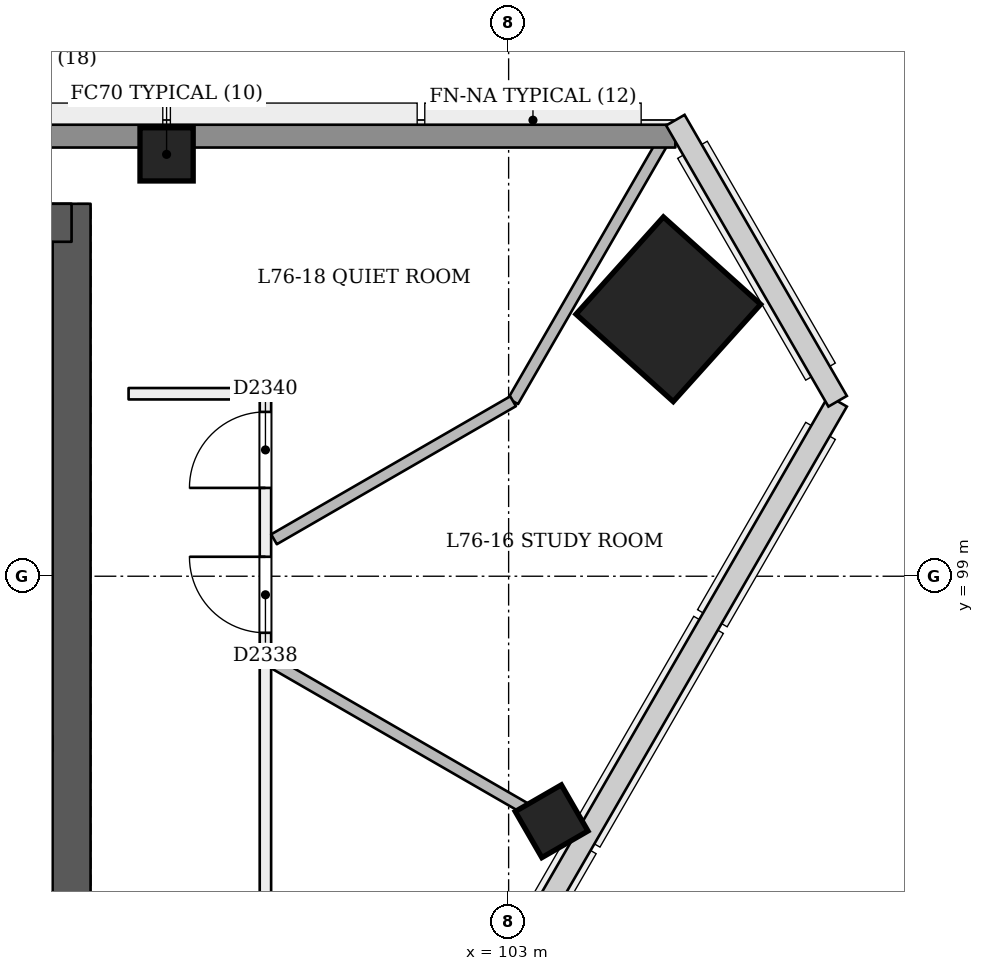
"""IFC4 building model, lengths in metres.
Left out: names, types, materials, properties, quantities, classifications, styles, units other than length and angle.
Written with IfcOpenShell. Run it as: python <this file> out.ifc"""

import sys

from ifc_helpers import new_model, si_unit, direction, frame, frame_2d, origin, origin_2d, place, context, subcontext, project, spatial, rectangle, extrude, element, fill, save


model = new_model("IFC4")
c1 = context("Model", 3, precision=1e-05, world=origin(), true_north=direction((0.0, 1.0)))
c2 = subcontext(c1, "Body", "Model", "MODEL_VIEW")
j1 = project(units=[si_unit("LENGTHUNIT", "METRE"), si_unit("PLANEANGLEUNIT", "RADIAN")], contexts=[c1])
p1 = place(None, origin())
s1 = spatial("IfcSite", under=j1, at=p1, CompositionType="ELEMENT")
p2 = place(p1, origin())
s2 = spatial("IfcBuilding", under=s1, at=p2, CompositionType="ELEMENT")
p3 = place(p2, frame((0.0, 0.0, 295.0)))
s3 = spatial("IfcBuildingStorey", under=s2, at=p3, CompositionType="ELEMENT", Elevation=295.0)
p4 = place(p3, frame((97.25, 93.15, 0.0), z_axis=(0.0, 0.0, 1.0), x_axis=(0.0, 1.0, 0.0)))
e1 = element("IfcWall", 1, at=p4, inside=s3, PredefinedType="SHEAR", context=c2, shape_type="SweptSolid", body=[
    extrude(rectangle(XDim=10.75, YDim=0.5, at=frame_2d((5.375, 0.0))), origin(), (0.0, 0.0, 1.0), 3.6),
])
p5 = place(p3, frame((97.25, 103.65, 0.0), z_axis=(0.0, 0.0, 1.0), x_axis=(-1.0, 0.0, 0.0)))
e2 = element("IfcWall", 2, at=p5, inside=s3, PredefinedType="SHEAR", context=c2, shape_type="SweptSolid", body=[
    extrude(rectangle(XDim=24.75, YDim=0.5, at=frame_2d((12.375, 0.0))), origin(), (0.0, 0.0, 1.0), 3.6),
])
p6 = place(p3, frame((105.135, 102.501, 0.0), z_axis=(-0.028401796786, 0.009286506348, 0.999553449666), x_axis=(0.49888889343, -0.8663809353, 0.02222491757)))
e3 = element("IfcColumn", 3, at=p6, inside=s3, PredefinedType="COLUMN", context=c2, shape_type="SweptSolid", body=[
    extrude(rectangle(XDim=1.72, YDim=1.72, at=origin_2d()), origin(), (0.0, 0.0, 1.0), 3.602),
])
p7 = place(p3, frame((98.5, 104.55, 0.0), z_axis=(0.0, 0.0, 1.0), x_axis=(1.0, 0.0, 0.0)))
e4 = element("IfcColumn", 4, at=p7, inside=s3, PredefinedType="COLUMN", context=c2, shape_type="SweptSolid", body=[
    extrude(rectangle(XDim=0.7, YDim=0.7, at=origin_2d()), origin(), (0.0, 0.0, 1.0), 3.6),
])
p8 = place(p3, frame((103.593, 95.729, -0.021), z_axis=(-0.02222134892, 0.038480872521, 0.999012229206), x_axis=(-0.500174577835, -0.86563950587, 0.022217955907)))
e5 = element("IfcColumn", 5, at=p8, inside=s3, PredefinedType="COLUMN", context=c2, shape_type="SweptSolid", body=[
    extrude(rectangle(XDim=0.7, YDim=0.7, at=origin_2d()), origin(), (0.0, 0.0, 1.0), 3.604),
])
p9 = place(p3, frame((99.8, 90.7, 0.0), z_axis=(0.0, 0.0, 1.0), x_axis=(6.844627e-05, 0.999999997658, 0.0)))
e6 = element("IfcWall", 6, at=p9, inside=s3, PredefinedType="PARTITIONING", context=c2, shape_type="SweptSolid", body=[
    extrude(rectangle(XDim=10.701, YDim=0.15, at=frame_2d((5.35, 0.0))), origin(), (0.0, 0.0, 1.0), 3.2),
])
p10 = place(p9, frame((7.556, 0.0, 0.0)))
e7 = element("IfcOpeningElement", 7, at=p10, cuts=e6, PredefinedType="OPENING", context=c2, shape_type="SweptSolid", body=[
    extrude(rectangle(XDim=1.0, YDim=2.1, at=frame_2d((0.5, 1.05))), frame((0.0, 0.085, 0.0), z_axis=(0.0, -1.0, 0.0), x_axis=(1.0, 0.0, 0.0)), (0.0, 0.0, 1.0), 0.171),
])
p11 = place(p9, frame((9.462, 0.0, 0.0)))
e8 = element("IfcOpeningElement", 8, at=p11, cuts=e6, PredefinedType="OPENING", context=c2, shape_type="SweptSolid", body=[
    extrude(rectangle(XDim=1.0, YDim=2.1, at=frame_2d((0.5, 1.05))), frame((0.0, 0.085, 0.0), z_axis=(0.0, -1.0, 0.0), x_axis=(1.0, 0.0, 0.0)), (0.0, 0.0, 1.0), 0.171),
])
p12 = place(p3, frame((99.726, 101.401, 0.0), z_axis=(0.0, 0.0, 1.0), x_axis=(-0.999999989991, 0.000141482738, 0.0)))
e9 = element("IfcWall", 9, at=p12, inside=s3, PredefinedType="PARTITIONING", context=c2, shape_type="SweptSolid", body=[
    extrude(rectangle(XDim=1.726, YDim=0.15, at=frame_2d((0.863, 0.0))), origin(), (0.0, 0.0, 1.0), 3.2),
])
p13 = place(p3, frame((103.895, 95.555, 0.0), z_axis=(0.0, 0.0, 1.0), x_axis=(-0.866029087811, 0.499993619025, 0.0)))
e10 = element("IfcWall", 10, at=p13, inside=s3, PredefinedType="PARTITIONING", context=c2, shape_type="SweptSolid", body=[
    extrude(rectangle(XDim=4.598, YDim=0.15, at=frame_2d((2.299, 0.0))), origin(), (0.0, 0.0, 1.0), 2.7),
])
p14 = place(p3, frame((105.136, 104.9, 0.0), z_axis=(0.0, 0.0, 1.0), x_axis=(-0.4999818889, -0.866035859981, 0.0)))
e11 = element("IfcWall", 11, at=p14, inside=s3, PredefinedType="PARTITIONING", context=c2, shape_type="SweptSolid", body=[
    extrude(rectangle(XDim=4.155, YDim=0.15, at=frame_2d((2.077, 0.0))), origin(), (0.0, 0.0, 1.0), 2.7),
])
p15 = place(p3, frame((103.059, 101.302, 0.0), z_axis=(0.0, 0.0, 1.0), x_axis=(-0.866042310294, -0.499970715924, 0.0)))
e12 = element("IfcWall", 12, at=p15, inside=s3, PredefinedType="PARTITIONING", context=c2, shape_type="SweptSolid", body=[
    extrude(rectangle(XDim=3.632, YDim=0.15, at=frame_2d((1.816, 0.0))), origin(), (0.0, 0.0, 1.0), 3.2),
])
p16 = place(p3, frame((64.806, 104.79, 0.0), z_axis=(0.0, 0.0, 1.0), x_axis=(1.0, 0.0, 0.0)))
e13 = element("IfcWall", 13, at=p16, inside=s3, PredefinedType="SOLIDWALL", context=c2, shape_type="SweptSolid", body=[
    extrude(rectangle(XDim=40.387, YDim=0.3, at=frame_2d((20.194, 0.0))), origin(), (0.0, 0.0, 1.0), 2.7),
])
p17 = place(p10, origin())
e14 = element("IfcDoor", 14, at=p17, inside=s3, OperationType="SINGLE_SWING_RIGHT", PredefinedType="NOTDEFINED", context=c2, shape_type="SweptSolid", body=[
    extrude(rectangle(XDim=1.0, YDim=2.1, at=frame_2d((0.5, 1.05))), frame((0.0, 0.025, 0.0), z_axis=(0.0, -1.0, 0.0), x_axis=(1.0, 0.0, 0.0)), (0.0, 0.0, 1.0), 0.05),
])
fill(e7, e14)
p18 = place(p11, origin())
e15 = element("IfcDoor", 15, at=p18, inside=s3, OperationType="SINGLE_SWING_LEFT", PredefinedType="NOTDEFINED", context=c2, shape_type="SweptSolid", body=[
    extrude(rectangle(XDim=1.0, YDim=2.1, at=frame_2d((0.5, 1.05))), frame((0.0, 0.025, 0.0), z_axis=(0.0, -1.0, 0.0), x_axis=(1.0, 0.0, 0.0)), (0.0, 0.0, 1.0), 0.05),
])
fill(e8, e15)
save(model, sys.argv[1])
